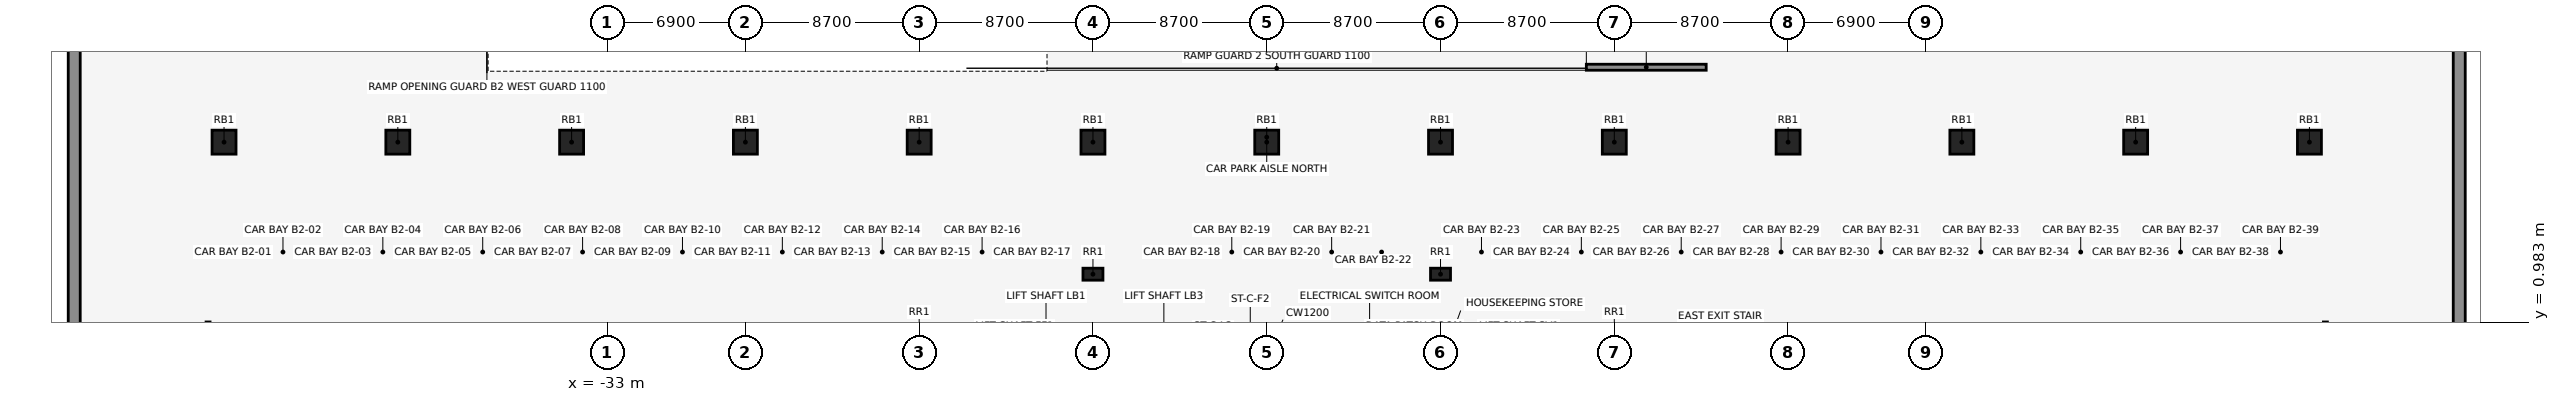
"""IFC4 building model, lengths in metres.
Left out: names, types, materials, properties, quantities, classifications, styles, units other than length and angle.
Written with IfcOpenShell. Run it as: python <this file> out.ifc"""

import sys

from ifc_helpers import new_model, si_unit, direction, frame, frame_2d, origin, origin_2d, place, context, subcontext, project, spatial, rectangle, extrude, element, save


model = new_model("IFC4")
c1 = context("Model", 3, precision=1e-05, world=origin(), true_north=direction((0.0, 1.0)))
c2 = subcontext(c1, "Body", "Model", "MODEL_VIEW")
j1 = project(units=[si_unit("LENGTHUNIT", "METRE"), si_unit("PLANEANGLEUNIT", "RADIAN")], contexts=[c1])
p1 = place(None, origin())
s1 = spatial("IfcSite", under=j1, at=p1, CompositionType="ELEMENT")
p2 = place(p1, origin())
s2 = spatial("IfcBuilding", under=s1, at=p2, CompositionType="ELEMENT")
p3 = place(p2, frame((0.0, 0.0, -10.0)))
s3 = spatial("IfcBuildingStorey", under=s2, at=p3, CompositionType="ELEMENT", Elevation=-10.0)
for number, where, z_axis, x_axis in (
    (1, (-8.7, 3.391, 0.0), (0.0, 0.0, 1.0), (1.0, 0.0, 0.0)),
    (2, (8.7, 3.391, 0.0), (0.0, 0.0, 1.0), (1.0, 0.0, 0.0)),
):
    element("IfcColumn", number, at=place(p3, frame(where, z_axis=z_axis, x_axis=x_axis)), inside=s3, PredefinedType="COLUMN", context=c2, shape_type="SweptSolid", body=[
        extrude(rectangle(XDim=1.0, YDim=0.6, at=origin_2d()), origin(), (0.0, 0.0, 1.0), 5.0),
    ])
for number, where, z_axis, x_axis in (
    (3, (-52.2, 10.0, 0.0), (0.0, 0.0, 1.0), (1.0, 0.0, 0.0)),
    (4, (-43.5, 10.0, 0.0), (0.0, 0.0, 1.0), (1.0, 0.0, 0.0)),
    (5, (-34.8, 10.0, 0.0), (0.0, 0.0, 1.0), (1.0, 0.0, 0.0)),
    (6, (-26.1, 10.0, 0.0), (0.0, 0.0, 1.0), (1.0, 0.0, 0.0)),
    (7, (-17.4, 10.0, 0.0), (0.0, 0.0, 1.0), (1.0, 0.0, 0.0)),
    (8, (-8.7, 10.0, 0.0), (0.0, 0.0, 1.0), (1.0, 0.0, 0.0)),
    (9, (0.0, 10.0, 0.0), (0.0, 0.0, 1.0), (1.0, 0.0, 0.0)),
    (10, (8.7, 10.0, 0.0), (0.0, 0.0, 1.0), (1.0, 0.0, 0.0)),
    (11, (17.4, 10.0, 0.0), (0.0, 0.0, 1.0), (1.0, 0.0, 0.0)),
    (12, (26.1, 10.0, 0.0), (0.0, 0.0, 1.0), (1.0, 0.0, 0.0)),
    (13, (34.8, 10.0, 0.0), (0.0, 0.0, 1.0), (1.0, 0.0, 0.0)),
    (14, (43.5, 10.0, 0.0), (0.0, 0.0, 1.0), (1.0, 0.0, 0.0)),
    (15, (52.2, 10.0, 0.0), (0.0, 0.0, 1.0), (1.0, 0.0, 0.0)),
):
    element("IfcColumn", number, at=place(p3, frame(where, z_axis=z_axis, x_axis=x_axis)), inside=s3, PredefinedType="COLUMN", context=c2, shape_type="SweptSolid", body=[
        extrude(rectangle(XDim=1.2, YDim=1.2, at=origin_2d()), origin(), (0.0, 0.0, 1.0), 5.0),
    ])
for number, where, z_axis, x_axis in (
    (16, (-59.7, -61.4, 0.0), (0.0, 0.0, 1.0), (0.0, 1.0, 0.0)),
    (17, (59.7, -61.4, 0.0), (0.0, 0.0, 1.0), (0.0, 1.0, 0.0)),
):
    element("IfcWall", number, at=place(p3, frame(where, z_axis=z_axis, x_axis=x_axis)), inside=s3, PredefinedType="SOLIDWALL", context=c2, shape_type="SweptSolid", body=[
        extrude(rectangle(XDim=80.8, YDim=0.6, at=frame_2d((40.4, 0.0))), origin(), (0.0, 0.0, 1.0), 5.0),
    ])
p4 = place(p3, frame((16.0, 13.75, 0.0), z_axis=(0.0, 0.0, 1.0), x_axis=(1.0, 0.0, 0.0)))
e18 = element("IfcWall", 18, at=p4, inside=s3, PredefinedType="SOLIDWALL", context=c2, shape_type="SweptSolid", body=[
    extrude(rectangle(XDim=6.0, YDim=0.3, at=frame_2d((3.0, 0.0))), origin(), (0.0, 0.0, 1.0), 4.7),
])
save(model, sys.argv[1])
